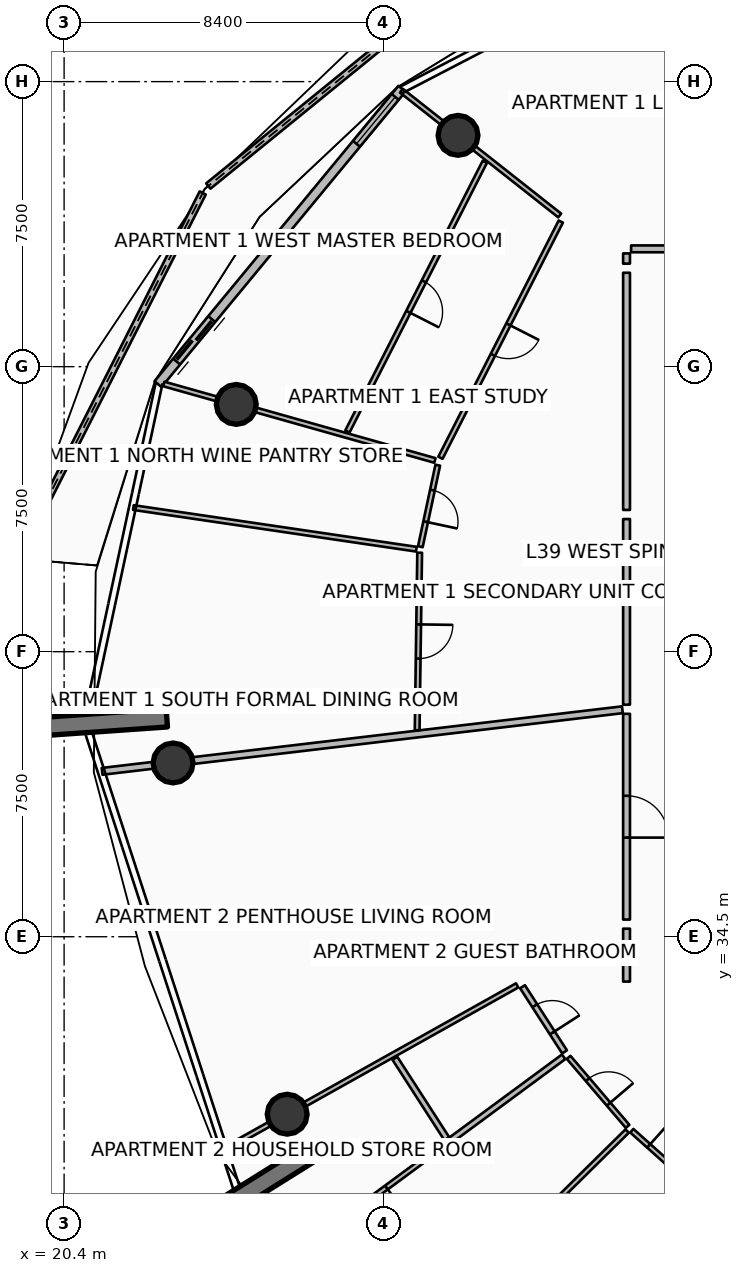
"""IFC4 building model, lengths in metres.
Left out: names, types, materials, properties, quantities, classifications, styles, units other than length and angle.
Written with IfcOpenShell. Run it as: python <this file> out.ifc"""

import sys

from ifc_helpers import new_model, si_unit, direction, frame, frame_2d, origin, origin_2d, place, context, subcontext, project, spatial, polyline, rectangle, circle, outline, extrude, element, fill, save


model = new_model("IFC4")
c1 = context("Model", 3, precision=1e-05, world=origin(), true_north=direction((0.0, 1.0)))
c2 = subcontext(c1, "Body", "Model", "MODEL_VIEW")
j1 = project(units=[si_unit("LENGTHUNIT", "METRE"), si_unit("PLANEANGLEUNIT", "RADIAN")], contexts=[c1])
p1 = place(None, origin())
s1 = spatial("IfcSite", under=j1, at=p1, CompositionType="ELEMENT")
p2 = place(p1, origin())
s2 = spatial("IfcBuilding", under=s1, at=p2, CompositionType="ELEMENT")
p3 = place(p2, frame((0.0, 0.0, 157.8)))
s3 = spatial("IfcBuildingStorey", under=s2, at=p3, CompositionType="ELEMENT", Elevation=157.8)
for number, where, z_axis, x_axis in (
    (1, (23.103, 40.259, 0.0), (0.0, 0.0, 1.0), (-0.998, -0.07, 0.0)),
    (2, (26.835, 28.774, 0.0), (0.0, 0.0, 1.0), (-0.848, -0.53, 0.0)),
):
    element("IfcWall", number, at=place(p3, frame(where, z_axis=z_axis, x_axis=x_axis)), inside=s3, PredefinedType="SOLIDWALL", context=c2, shape_type="SweptSolid", body=[
        extrude(rectangle(XDim=3.5, YDim=0.48, at=frame_2d((1.75, 0.0))), origin(), (0.0, 0.0, 1.0), 3.75),
    ])
for number, where, z_axis, x_axis in (
    (3, (30.766, 55.586, 0.0), (0.0, 0.0, 1.0), (1.0, 0.0, 0.0)),
    (4, (24.93, 48.506, 0.0), (0.0, 0.0, 1.0), (1.0, 0.0, 0.0)),
    (5, (23.267, 39.073, 0.0), (0.0, 0.0, 1.0), (1.0, 0.0, 0.0)),
    (6, (26.27, 29.831, 0.0), (0.0, 0.0, 1.0), (1.0, 0.0, 0.0)),
):
    element("IfcColumn", number, at=place(p3, frame(where, z_axis=z_axis, x_axis=x_axis)), inside=s3, PredefinedType="COLUMN", context=c2, shape_type="SweptSolid", body=[
        extrude(circle(Radius=0.525, at=origin_2d()), origin(), (0.0, 0.0, 1.0), 3.5),
    ])
p4 = place(p3, frame((31.951, 60.56, 0.0), z_axis=(0.0, 0.0, 1.0), x_axis=(-0.77587192649, -0.630890445073, 0.0)))
e7 = element("IfcWall", 7, at=p4, inside=s3, PredefinedType="PARAPET", context=c2, shape_type="SweptSolid", body=[
    extrude(outline(polyline([(0.0, 0.0), (9.998, 0.0), (9.998, 1.148), (4.999, 1.127), (0.0, 1.224), (0.0, 0.0)])), frame((0.0, 0.09, 0.0), z_axis=(0.0, -1.0, 0.0), x_axis=(1.0, 0.0, 0.0)), (0.0, 0.0, 1.0), 0.18),
])
p5 = place(p3, frame((24.047, 54.07, 0.0), z_axis=(0.0, 0.0, 1.0), x_axis=(-0.452409779831, -0.891810176615, 0.0)))
e8 = element("IfcWall", 8, at=p5, inside=s3, PredefinedType="PARAPET", context=c2, shape_type="SweptSolid", body=[
    extrude(outline(polyline([(0.0, 0.0), (10.791, 0.0), (10.791, 1.483), (5.395, 1.284), (0.0, 1.148), (0.0, 0.0)])), frame((0.0, 0.09, 0.0), z_axis=(0.0, -1.0, 0.0), x_axis=(1.0, 0.0, 0.0)), (0.0, 0.0, 1.0), 0.18),
])
p6 = place(p3, frame((29.291, 56.813, 0.0), z_axis=(0.0, 0.0, 1.0), x_axis=(-0.636771922292, -0.77105221547, 0.0)))
e9 = element("IfcWall", 9, at=p6, inside=s3, PredefinedType="SOLIDWALL", context=c2, shape_type="SweptSolid", body=[
    extrude(rectangle(XDim=10.082, YDim=0.24, at=frame_2d((5.041, 0.0))), origin(), (0.0, 0.0, 1.0), 2.45),
])
p7 = place(p6, frame((7.862, 0.0, 0.0)))
e10 = element("IfcOpeningElement", 10, at=p7, cuts=e9, PredefinedType="OPENING", context=c2, shape_type="SweptSolid", body=[
    extrude(rectangle(XDim=1.45, YDim=2.15, at=frame_2d((0.725, 1.075))), frame((0.0, 0.13, 0.0), z_axis=(0.0, -1.0, 0.0), x_axis=(1.0, 0.0, 0.0)), (0.0, 0.0, 1.0), 0.26),
])
p8 = place(p6, frame((0.28, 0.0, 0.65)))
e11 = element("IfcOpeningElement", 11, at=p8, cuts=e9, PredefinedType="OPENING", context=c2, shape_type="SweptSolid", body=[
    extrude(rectangle(XDim=1.6, YDim=1.5, at=frame_2d((0.8, 0.75))), frame((0.0, 0.13, 0.0), z_axis=(0.0, -1.0, 0.0), x_axis=(1.0, 0.0, 0.0)), (0.0, 0.0, 1.0), 0.26),
])
p9 = place(p3, frame((35.091, 40.472, 0.0), z_axis=(0.0, 0.0, 1.0), x_axis=(-0.993067434621, -0.11754603479, 0.0)))
e12 = element("IfcWall", 12, at=p9, inside=s3, PredefinedType="PARTITIONING", context=c2, shape_type="SweptSolid", body=[
    extrude(rectangle(XDim=13.787, YDim=0.18, at=frame_2d((6.894, 0.0))), origin(), (0.0, 0.0, 1.0), 2.94),
])
p10 = place(p3, frame((41.944, 52.6, 0.0), z_axis=(0.0, 0.0, 1.0), x_axis=(-1.0, 0.0, 0.0)))
e13 = element("IfcWall", 13, at=p10, inside=s3, PredefinedType="PARTITIONING", context=c2, shape_type="SweptSolid", body=[
    extrude(rectangle(XDim=6.624, YDim=0.18, at=frame_2d((3.312, 0.0))), origin(), (0.0, 0.0, 1.0), 2.94),
])
p11 = place(p10, frame((2.762, 0.0, 0.0)))
e14 = element("IfcOpeningElement", 14, at=p11, cuts=e13, PredefinedType="OPENING", context=c2, shape_type="SweptSolid", body=[
    extrude(rectangle(XDim=1.1, YDim=2.1, at=frame_2d((0.55, 1.05))), frame((0.0, 0.1, 0.0), z_axis=(0.0, -1.0, 0.0), x_axis=(1.0, 0.0, 0.0)), (0.0, 0.0, 1.0), 0.2),
])
p12 = place(p3, frame((35.2, 52.48, 0.0), z_axis=(0.0, 0.0, 1.0), x_axis=(0.0, -1.0, 0.0)))
e15 = element("IfcWall", 15, at=p12, inside=s3, PredefinedType="PARTITIONING", context=c2, shape_type="SweptSolid", body=[
    extrude(rectangle(XDim=0.269, YDim=0.18, at=frame_2d((0.135, 0.0))), origin(), (0.0, 0.0, 1.0), 2.94),
])
p13 = place(p3, frame((35.2, 51.971, 0.0), z_axis=(0.0, 0.0, 1.0), x_axis=(0.0, -1.0, 0.0)))
e16 = element("IfcWall", 16, at=p13, inside=s3, PredefinedType="PARTITIONING", context=c2, shape_type="SweptSolid", body=[
    extrude(rectangle(XDim=6.241, YDim=0.18, at=frame_2d((3.12, 0.0))), origin(), (0.0, 0.0, 1.0), 2.94),
])
p14 = place(p3, frame((33.441, 53.477, 0.0), z_axis=(0.0, 0.0, 1.0), x_axis=(-0.785319981095, 0.619090080112, 0.0)))
e17 = element("IfcWall", 17, at=p14, inside=s3, PredefinedType="PARTITIONING", context=c2, shape_type="SweptSolid", body=[
    extrude(rectangle(XDim=5.301, YDim=0.125, at=frame_2d((2.65, 0.0))), origin(), (0.0, 0.0, 1.0), 2.94),
])
p15 = place(p3, frame((33.469, 53.317, 0.0), z_axis=(0.0, 0.0, 1.0), x_axis=(-0.453977694262, -0.891013048789, 0.0)))
e18 = element("IfcWall", 18, at=p15, inside=s3, PredefinedType="PARTITIONING", context=c2, shape_type="SweptSolid", body=[
    extrude(rectangle(XDim=6.974, YDim=0.125, at=frame_2d((3.487, 0.0))), origin(), (0.0, 0.0, 1.0), 2.94),
])
p16 = place(p15, frame((3.037, 0.0, 0.0)))
e19 = element("IfcOpeningElement", 19, at=p16, cuts=e18, PredefinedType="OPENING", context=c2, shape_type="SweptSolid", body=[
    extrude(rectangle(XDim=0.9, YDim=2.08, at=frame_2d((0.45, 1.04))), frame((0.0, 0.073, 0.0), z_axis=(0.0, -1.0, 0.0), x_axis=(1.0, 0.0, 0.0)), (0.0, 0.0, 1.0), 0.145),
])
p17 = place(p3, frame((31.472, 54.892, 0.0), z_axis=(0.0, 0.0, 1.0), x_axis=(-0.453991424948, -0.89100605277, 0.0)))
e20 = element("IfcWall", 20, at=p17, inside=s3, PredefinedType="PARTITIONING", context=c2, shape_type="SweptSolid", body=[
    extrude(rectangle(XDim=7.967, YDim=0.125, at=frame_2d((3.983, 0.0))), origin(), (0.0, 0.0, 1.0), 2.94),
])
p18 = place(p17, frame((3.534, 0.0, 0.0)))
e21 = element("IfcOpeningElement", 21, at=p18, cuts=e20, PredefinedType="OPENING", context=c2, shape_type="SweptSolid", body=[
    extrude(rectangle(XDim=0.9, YDim=2.08, at=frame_2d((0.45, 1.04))), frame((0.0, 0.073, 0.0), z_axis=(0.0, -1.0, 0.0), x_axis=(1.0, 0.0, 0.0)), (0.0, 0.0, 1.0), 0.145),
])
p19 = place(p3, frame((35.2, 45.49, 0.0), z_axis=(0.0, 0.0, 1.0), x_axis=(0.0, -1.0, 0.0)))
e22 = element("IfcWall", 22, at=p19, inside=s3, PredefinedType="PARTITIONING", context=c2, shape_type="SweptSolid", body=[
    extrude(rectangle(XDim=4.885, YDim=0.18, at=frame_2d((2.442, 0.0))), origin(), (0.0, 0.0, 1.0), 2.94),
])
p20 = place(p3, frame((30.157, 47.032, 0.0), z_axis=(0.0, 0.0, 1.0), x_axis=(-0.962456736489, 0.271435131084, 0.0)))
e23 = element("IfcWall", 23, at=p20, inside=s3, PredefinedType="PARTITIONING", context=c2, shape_type="SweptSolid", body=[
    extrude(rectangle(XDim=7.412, YDim=0.125, at=frame_2d((3.706, 0.0))), origin(), (0.0, 0.0, 1.0), 2.94),
])
p21 = place(p3, frame((29.668, 44.697, 0.0), z_axis=(0.0, 0.0, 1.0), x_axis=(-0.989352403942, 0.145539756815, 0.0)))
e24 = element("IfcWall", 24, at=p21, inside=s3, PredefinedType="PARTITIONING", context=c2, shape_type="SweptSolid", body=[
    extrude(rectangle(XDim=7.525, YDim=0.125, at=frame_2d((3.763, 0.0))), origin(), (0.0, 0.0, 1.0), 2.94),
])
p22 = place(p3, frame((30.232, 46.907, 0.0), z_axis=(0.0, 0.0, 1.0), x_axis=(-0.208920938613, -0.977932534181, 0.0)))
e25 = element("IfcWall", 25, at=p22, inside=s3, PredefinedType="PARTITIONING", context=c2, shape_type="SweptSolid", body=[
    extrude(rectangle(XDim=2.193, YDim=0.125, at=frame_2d((1.097, 0.0))), origin(), (0.0, 0.0, 1.0), 2.94),
])
p23 = place(p22, frame((0.672, 0.0, 0.0)))
e26 = element("IfcOpeningElement", 26, at=p23, cuts=e25, PredefinedType="OPENING", context=c2, shape_type="SweptSolid", body=[
    extrude(rectangle(XDim=0.85, YDim=2.06, at=frame_2d((0.425, 1.03))), frame((0.0, 0.073, 0.0), z_axis=(0.0, -1.0, 0.0), x_axis=(1.0, 0.0, 0.0)), (0.0, 0.0, 1.0), 0.145),
])
p24 = place(p3, frame((29.756, 44.604, 0.0), z_axis=(0.0, 0.0, 1.0), x_axis=(-0.014161849223, -0.999899715985, 0.0)))
e27 = element("IfcWall", 27, at=p24, inside=s3, PredefinedType="PARTITIONING", context=c2, shape_type="SweptSolid", body=[
    extrude(rectangle(XDim=4.672, YDim=0.125, at=frame_2d((2.336, 0.0))), origin(), (0.0, 0.0, 1.0), 2.94),
])
p25 = place(p24, frame((1.886, 0.0, 0.0)))
e28 = element("IfcOpeningElement", 28, at=p25, cuts=e27, PredefinedType="OPENING", context=c2, shape_type="SweptSolid", body=[
    extrude(rectangle(XDim=0.9, YDim=2.08, at=frame_2d((0.45, 1.04))), frame((0.0, 0.073, 0.0), z_axis=(0.0, -1.0, 0.0), x_axis=(1.0, 0.0, 0.0)), (0.0, 0.0, 1.0), 0.145),
])
p26 = place(p3, frame((35.2, 40.365, 0.0), z_axis=(0.0, 0.0, 1.0), x_axis=(0.0, -1.0, 0.0)))
e29 = element("IfcWall", 29, at=p26, inside=s3, PredefinedType="PARTITIONING", context=c2, shape_type="SweptSolid", body=[
    extrude(rectangle(XDim=5.413, YDim=0.18, at=frame_2d((2.707, 0.0))), origin(), (0.0, 0.0, 1.0), 2.94),
])
p27 = place(p26, frame((2.156, 0.0, 0.0)))
e30 = element("IfcOpeningElement", 30, at=p27, cuts=e29, PredefinedType="OPENING", context=c2, shape_type="SweptSolid", body=[
    extrude(rectangle(XDim=1.1, YDim=2.1, at=frame_2d((0.55, 1.05))), frame((0.0, 0.1, 0.0), z_axis=(0.0, -1.0, 0.0), x_axis=(1.0, 0.0, 0.0)), (0.0, 0.0, 1.0), 0.2),
])
p28 = place(p3, frame((35.2, 34.712, 0.0), z_axis=(0.0, 0.0, 1.0), x_axis=(0.0, -1.0, 0.0)))
e31 = element("IfcWall", 31, at=p28, inside=s3, PredefinedType="PARTITIONING", context=c2, shape_type="SweptSolid", body=[
    extrude(rectangle(XDim=1.392, YDim=0.18, at=frame_2d((0.696, 0.0))), origin(), (0.0, 0.0, 1.0), 2.94),
])
p29 = place(p3, frame((32.321, 33.219, 0.0), z_axis=(0.0, 0.0, 1.0), x_axis=(-0.872493265844, -0.488626136281, 0.0)))
e32 = element("IfcWall", 32, at=p29, inside=s3, PredefinedType="PARTITIONING", context=c2, shape_type="SweptSolid", body=[
    extrude(rectangle(XDim=8.816, YDim=0.125, at=frame_2d((4.408, 0.0))), origin(), (0.0, 0.0, 1.0), 2.94),
])
p30 = place(p3, frame((32.463, 33.184, 0.0), z_axis=(0.0, 0.0, 1.0), x_axis=(0.542099612135, -0.840314233203, 0.0)))
e33 = element("IfcWall", 33, at=p30, inside=s3, PredefinedType="PARTITIONING", context=c2, shape_type="SweptSolid", body=[
    extrude(rectangle(XDim=2.04, YDim=0.15, at=frame_2d((1.02, 0.0))), origin(), (0.0, 0.0, 1.0), 2.94),
])
p31 = place(p30, frame((0.595, 0.0, 0.0)))
e34 = element("IfcOpeningElement", 34, at=p31, cuts=e33, PredefinedType="OPENING", context=c2, shape_type="SweptSolid", body=[
    extrude(rectangle(XDim=0.85, YDim=2.06, at=frame_2d((0.425, 1.03))), frame((0.0, 0.085, 0.0), z_axis=(0.0, -1.0, 0.0), x_axis=(1.0, 0.0, 0.0)), (0.0, 0.0, 1.0), 0.17),
])
p32 = place(p3, frame((29.104, 31.303, 0.0), z_axis=(0.0, 0.0, 1.0), x_axis=(0.542142313724, -0.840286684216, 0.0)))
e35 = element("IfcWall", 35, at=p32, inside=s3, PredefinedType="PARTITIONING", context=c2, shape_type="SweptSolid", body=[
    extrude(rectangle(XDim=2.521, YDim=0.15, at=frame_2d((1.26, 0.0))), origin(), (0.0, 0.0, 1.0), 2.94),
])
p33 = place(p3, frame((33.545, 31.341, 0.0), z_axis=(0.0, 0.0, 1.0), x_axis=(-0.804856199216, -0.593469880097, 0.0)))
e36 = element("IfcWall", 36, at=p33, inside=s3, PredefinedType="PARTITIONING", context=c2, shape_type="SweptSolid", body=[
    extrude(rectangle(XDim=3.72, YDim=0.15, at=frame_2d((1.86, 0.0))), origin(), (0.0, 0.0, 1.0), 2.94),
])
p34 = place(p3, frame((30.446, 29.056, 0.0), z_axis=(0.0, 0.0, 1.0), x_axis=(-0.804837038538, -0.593495864684, 0.0)))
e37 = element("IfcWall", 37, at=p34, inside=s3, PredefinedType="PARTITIONING", context=c2, shape_type="SweptSolid", body=[
    extrude(rectangle(XDim=4.741, YDim=0.125, at=frame_2d((2.371, 0.0))), origin(), (0.0, 0.0, 1.0), 2.94),
])
p35 = place(p34, frame((1.946, 0.0, 0.0)))
e38 = element("IfcOpeningElement", 38, at=p35, cuts=e37, PredefinedType="OPENING", context=c2, shape_type="SweptSolid", body=[
    extrude(rectangle(XDim=0.85, YDim=2.06, at=frame_2d((0.425, 1.03))), frame((0.0, 0.073, 0.0), z_axis=(0.0, -1.0, 0.0), x_axis=(1.0, 0.0, 0.0)), (0.0, 0.0, 1.0), 0.145),
])
p36 = place(p3, frame((35.215, 29.386, 0.0), z_axis=(0.0, 0.0, 1.0), x_axis=(-0.711845690147, -0.702335897857, 0.0)))
e39 = element("IfcWall", 39, at=p36, inside=s3, PredefinedType="PARTITIONING", context=c2, shape_type="SweptSolid", body=[
    extrude(rectangle(XDim=8.087, YDim=0.125, at=frame_2d((4.043, 0.0))), origin(), (0.0, 0.0, 1.0), 2.94),
])
p37 = place(p3, frame((33.676, 31.326, 0.0), z_axis=(0.0, 0.0, 1.0), x_axis=(0.649527713292, -0.760337918077, 0.0)))
e40 = element("IfcWall", 40, at=p37, inside=s3, PredefinedType="PARTITIONING", context=c2, shape_type="SweptSolid", body=[
    extrude(rectangle(XDim=2.388, YDim=0.125, at=frame_2d((1.194, 0.0))), origin(), (0.0, 0.0, 1.0), 2.94),
])
p38 = place(p37, frame((0.769, 0.0, 0.0)))
e41 = element("IfcOpeningElement", 41, at=p38, cuts=e40, PredefinedType="OPENING", context=c2, shape_type="SweptSolid", body=[
    extrude(rectangle(XDim=0.85, YDim=2.06, at=frame_2d((0.425, 1.03))), frame((0.0, 0.073, 0.0), z_axis=(0.0, -1.0, 0.0), x_axis=(1.0, 0.0, 0.0)), (0.0, 0.0, 1.0), 0.145),
])
p39 = place(p3, frame((35.339, 29.396, 0.0), z_axis=(0.0, 0.0, 1.0), x_axis=(0.745310033914, -0.666718046364, 0.0)))
e42 = element("IfcWall", 42, at=p39, inside=s3, PredefinedType="PARTITIONING", context=c2, shape_type="SweptSolid", body=[
    extrude(rectangle(XDim=2.044, YDim=0.125, at=frame_2d((1.022, 0.0))), origin(), (0.0, 0.0, 1.0), 2.94),
])
p40 = place(p39, frame((0.597, 0.0, 0.0)))
e43 = element("IfcOpeningElement", 43, at=p40, cuts=e42, PredefinedType="OPENING", context=c2, shape_type="SweptSolid", body=[
    extrude(rectangle(XDim=0.85, YDim=2.06, at=frame_2d((0.425, 1.03))), frame((0.0, 0.073, 0.0), z_axis=(0.0, -1.0, 0.0), x_axis=(1.0, 0.0, 0.0)), (0.0, 0.0, 1.0), 0.145),
])
p41 = place(p3, frame((36.875, 27.888, 0.0), z_axis=(0.0, 0.0, 1.0), x_axis=(-0.61910151414, -0.78531096719, 0.0)))
e44 = element("IfcWall", 44, at=p41, inside=s3, PredefinedType="PARTITIONING", context=c2, shape_type="SweptSolid", body=[
    extrude(rectangle(XDim=8.082, YDim=0.125, at=frame_2d((4.041, 0.0))), origin(), (0.0, 0.0, 1.0), 2.94),
])
p42 = place(p7, origin())
e45 = element("IfcDoor", 45, at=p42, inside=s3, OperationType="DOUBLE_DOOR_SLIDING", PredefinedType="DOOR", context=c2, shape_type="SweptSolid", body=[
    extrude(rectangle(XDim=1.45, YDim=2.15, at=frame_2d((0.725, 1.075))), frame((0.0, 0.025, 0.0), z_axis=(0.0, -1.0, 0.0), x_axis=(1.0, 0.0, 0.0)), (0.0, 0.0, 1.0), 0.05),
])
fill(e10, e45)
p43 = place(p8, origin())
e46 = element("IfcWindow", 46, at=p43, inside=s3, PartitioningType="SINGLE_PANEL", PredefinedType="WINDOW", context=c2, shape_type="SweptSolid", body=[
    extrude(rectangle(XDim=1.6, YDim=1.5, at=frame_2d((0.8, 0.75))), frame((0.0, 0.03, 0.0), z_axis=(0.0, -1.0, 0.0), x_axis=(1.0, 0.0, 0.0)), (0.0, 0.0, 1.0), 0.06),
])
fill(e11, e46)
p44 = place(p16, origin())
e47 = element("IfcDoor", 47, at=p44, inside=s3, OperationType="SINGLE_SWING_LEFT", PredefinedType="DOOR", context=c2, shape_type="SweptSolid", body=[
    extrude(rectangle(XDim=0.9, YDim=2.08, at=frame_2d((0.45, 1.04))), frame((0.0, 0.025, 0.0), z_axis=(0.0, -1.0, 0.0), x_axis=(1.0, 0.0, 0.0)), (0.0, 0.0, 1.0), 0.05),
])
fill(e19, e47)
p45 = place(p18, origin())
e48 = element("IfcDoor", 48, at=p45, inside=s3, OperationType="SINGLE_SWING_RIGHT", PredefinedType="DOOR", context=c2, shape_type="SweptSolid", body=[
    extrude(rectangle(XDim=0.9, YDim=2.08, at=frame_2d((0.45, 1.04))), frame((0.0, 0.025, 0.0), z_axis=(0.0, -1.0, 0.0), x_axis=(1.0, 0.0, 0.0)), (0.0, 0.0, 1.0), 0.05),
])
fill(e21, e48)
p46 = place(p23, origin())
e49 = element("IfcDoor", 49, at=p46, inside=s3, OperationType="SINGLE_SWING_RIGHT", PredefinedType="DOOR", context=c2, shape_type="SweptSolid", body=[
    extrude(rectangle(XDim=0.85, YDim=2.06, at=frame_2d((0.425, 1.03))), frame((0.0, 0.025, 0.0), z_axis=(0.0, -1.0, 0.0), x_axis=(1.0, 0.0, 0.0)), (0.0, 0.0, 1.0), 0.05),
])
fill(e26, e49)
p47 = place(p25, origin())
e50 = element("IfcDoor", 50, at=p47, inside=s3, OperationType="SINGLE_SWING_LEFT", PredefinedType="DOOR", context=c2, shape_type="SweptSolid", body=[
    extrude(rectangle(XDim=0.9, YDim=2.08, at=frame_2d((0.45, 1.04))), frame((0.0, 0.025, 0.0), z_axis=(0.0, -1.0, 0.0), x_axis=(1.0, 0.0, 0.0)), (0.0, 0.0, 1.0), 0.05),
])
fill(e28, e50)
p48 = place(p27, origin())
e51 = element("IfcDoor", 51, at=p48, inside=s3, OperationType="SINGLE_SWING_RIGHT", PredefinedType="DOOR", context=c2, shape_type="SweptSolid", body=[
    extrude(rectangle(XDim=1.1, YDim=2.1, at=frame_2d((0.55, 1.05))), frame((0.0, 0.025, 0.0), z_axis=(0.0, -1.0, 0.0), x_axis=(1.0, 0.0, 0.0)), (0.0, 0.0, 1.0), 0.05),
])
fill(e30, e51)
p49 = place(p31, origin())
e52 = element("IfcDoor", 52, at=p49, inside=s3, OperationType="SINGLE_SWING_RIGHT", PredefinedType="DOOR", context=c2, shape_type="SweptSolid", body=[
    extrude(rectangle(XDim=0.85, YDim=2.06, at=frame_2d((0.425, 1.03))), frame((0.0, 0.025, 0.0), z_axis=(0.0, -1.0, 0.0), x_axis=(1.0, 0.0, 0.0)), (0.0, 0.0, 1.0), 0.05),
])
fill(e34, e52)
p50 = place(p35, origin())
e53 = element("IfcDoor", 53, at=p50, inside=s3, OperationType="SINGLE_SWING_LEFT", PredefinedType="DOOR", context=c2, shape_type="SweptSolid", body=[
    extrude(rectangle(XDim=0.85, YDim=2.06, at=frame_2d((0.425, 1.03))), frame((0.0, 0.025, 0.0), z_axis=(0.0, -1.0, 0.0), x_axis=(1.0, 0.0, 0.0)), (0.0, 0.0, 1.0), 0.05),
])
fill(e38, e53)
p51 = place(p38, origin())
e54 = element("IfcDoor", 54, at=p51, inside=s3, OperationType="SINGLE_SWING_RIGHT", PredefinedType="DOOR", context=c2, shape_type="SweptSolid", body=[
    extrude(rectangle(XDim=0.85, YDim=2.06, at=frame_2d((0.425, 1.03))), frame((0.0, 0.025, 0.0), z_axis=(0.0, -1.0, 0.0), x_axis=(1.0, 0.0, 0.0)), (0.0, 0.0, 1.0), 0.05),
])
fill(e41, e54)
p52 = place(p40, origin())
e55 = element("IfcDoor", 55, at=p52, inside=s3, OperationType="SINGLE_SWING_LEFT", PredefinedType="DOOR", context=c2, shape_type="SweptSolid", body=[
    extrude(rectangle(XDim=0.85, YDim=2.06, at=frame_2d((0.425, 1.03))), frame((0.0, 0.025, 0.0), z_axis=(0.0, -1.0, 0.0), x_axis=(1.0, 0.0, 0.0)), (0.0, 0.0, 1.0), 0.05),
])
fill(e43, e55)
save(model, sys.argv[1])
